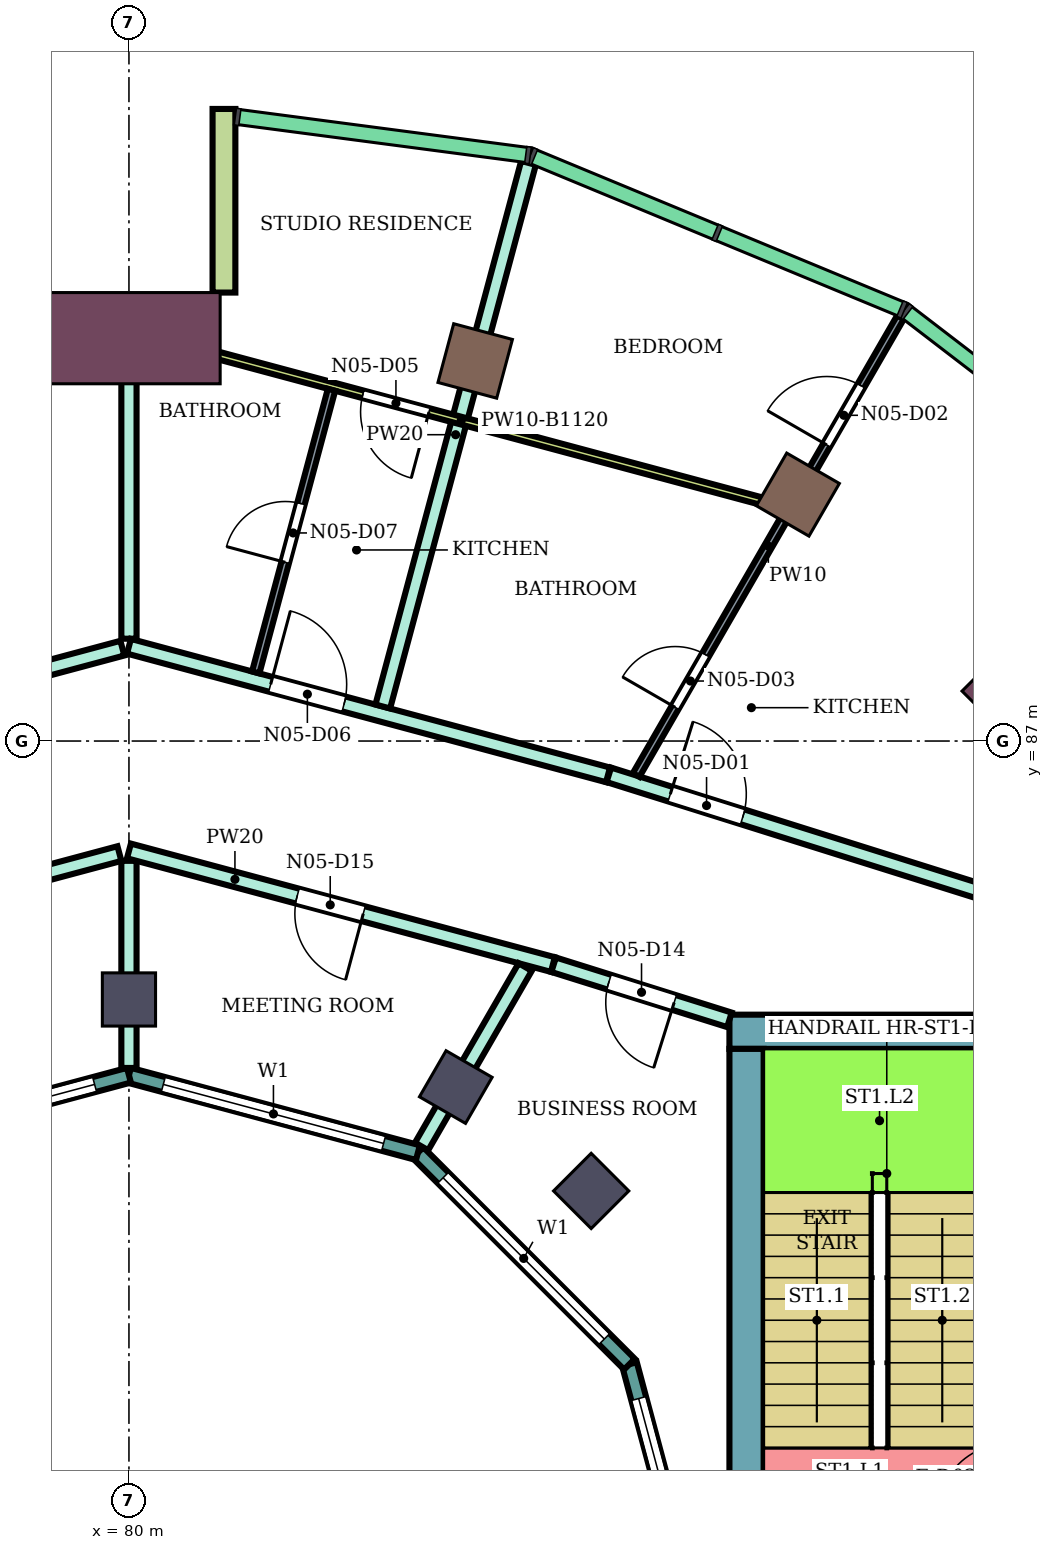
"""IFC4 building model, lengths in metres.
Left out: names, types, materials, properties, quantities, classifications, styles, units other than length and angle.
Written with IfcOpenShell. Run it as: python <this file> out.ifc"""

import sys

from ifc_helpers import new_model, si_unit, direction, frame, frame_2d, origin, origin_2d, place, context, subcontext, project, spatial, rectangle, extrude, element, fill, save


model = new_model("IFC4")
c1 = context("Model", 3, precision=1e-05, world=origin(), true_north=direction((0.0, 1.0)))
c2 = subcontext(c1, "Body", "Model", "MODEL_VIEW")
j1 = project(units=[si_unit("LENGTHUNIT", "METRE"), si_unit("PLANEANGLEUNIT", "RADIAN")], contexts=[c1])
p1 = place(None, origin())
s1 = spatial("IfcSite", under=j1, at=p1, CompositionType="ELEMENT")
p2 = place(p1, origin())
s2 = spatial("IfcBuilding", under=s1, at=p2, CompositionType="ELEMENT")
p3 = place(p2, frame((0.0, 0.0, 319.3)))
s3 = spatial("IfcBuildingStorey", under=s2, at=p3, CompositionType="ELEMENT", Elevation=319.3)
for number, where, z_axis, x_axis in (
    (1, (88.8, 90.242, 0.0), (0.0, 0.0, 1.0), (0.5, 0.866, 0.0)),
    (2, (84.555, 92.0, 0.0), (0.0, 0.0, 1.0), (0.259, 0.966, 0.0)),
):
    element("IfcColumn", number, at=place(p3, frame(where, z_axis=z_axis, x_axis=x_axis)), inside=s3, PredefinedType="COLUMN", context=c2, shape_type="SweptSolid", body=[
        extrude(rectangle(XDim=0.8, YDim=0.8, at=origin_2d()), origin(), (0.0, 0.0, 1.0), 4.4),
    ])
for number, where, z_axis, x_axis in (
    (3, (86.081, 81.081, 0.0), (0.0, 0.0, 1.0), (0.707, 0.707, 0.0)),
    (4, (84.3, 82.448, 0.0), (0.0, 0.0, 1.0), (0.5, 0.866, 0.0)),
    (5, (80.0, 83.6, 0.0), (0.0, 0.0, 1.0), (0.0, 1.0, 0.0)),
):
    element("IfcColumn", number, at=place(p3, frame(where, z_axis=z_axis, x_axis=x_axis)), inside=s3, PredefinedType="COLUMN", context=c2, shape_type="SweptSolid", body=[
        extrude(rectangle(XDim=0.7, YDim=0.7, at=origin_2d()), origin(), (0.0, 0.0, 1.0), 4.4),
    ])
for number, where, z_axis, x_axis in (
    (6, (92.233, 87.233, 0.0), (0.0, 0.0, 1.0), (0.707, 0.707, 0.0)),
    (7, (80.0, 92.3, 0.0), (0.0, 0.0, 1.0), (0.0, 1.0, 0.0)),
):
    element("IfcColumn", number, at=place(p3, frame(where, z_axis=z_axis, x_axis=x_axis)), inside=s3, PredefinedType="COLUMN", context=c2, shape_type="SweptSolid", body=[
        extrude(rectangle(XDim=1.2, YDim=2.4, at=origin_2d()), origin(), (0.0, 0.0, 1.0), 4.4),
    ])
p4 = place(p3, frame((87.9, 83.175, 0.0), z_axis=(0.0, 0.0, 1.0), x_axis=(1.0, 0.0, 0.0)))
e8 = element("IfcWall", 8, at=p4, inside=s3, PredefinedType="SHEAR", context=c2, shape_type="SweptSolid", body=[
    extrude(rectangle(XDim=10.0, YDim=0.45, at=frame_2d((5.0, 0.0))), origin(), (0.0, 0.0, 1.0), 4.08),
])
p5 = place(p4, frame((4.2, 0.0, 0.0)))
e9 = element("IfcOpeningElement", 9, at=p5, cuts=e8, PredefinedType="OPENING", context=c2, shape_type="SweptSolid", body=[
    extrude(rectangle(XDim=2.4, YDim=2.4, at=frame_2d((1.2, 1.2))), frame((0.0, 0.235, 0.0), z_axis=(0.0, -1.0, 0.0), x_axis=(1.0, 0.0, 0.0)), (0.0, 0.0, 1.0), 0.47),
])
p6 = place(p3, frame((88.125, 75.0, 0.0), z_axis=(0.0, 0.0, 1.0), x_axis=(0.0, 1.0, 0.0)))
e10 = element("IfcWall", 10, at=p6, inside=s3, PredefinedType="SHEAR", context=c2, shape_type="SweptSolid", body=[
    extrude(rectangle(XDim=7.95, YDim=0.45, at=frame_2d((3.975, 0.0))), origin(), (0.0, 0.0, 1.0), 4.08),
])
p7 = place(p3, frame((81.25, 92.9, 0.0), z_axis=(0.0, 0.0, 1.0), x_axis=(0.0, 1.0, 0.0)))
e11 = element("IfcWall", 11, at=p7, inside=s3, PredefinedType="NOTDEFINED", context=c2, shape_type="SweptSolid", body=[
    extrude(rectangle(XDim=2.416, YDim=0.3, at=frame_2d((1.208, 0.0))), origin(), (0.0, 0.0, 1.0), 4.4),
])
p8 = place(p3, frame((87.604, 75.0, 0.0), z_axis=(0.0, 0.0, 1.0), x_axis=(-0.258789828301, 0.965933654434, 0.0)))
e12 = element("IfcWall", 12, at=p8, inside=s3, PredefinedType="NOTDEFINED", context=c2, shape_type="SweptSolid", body=[
    extrude(rectangle(XDim=3.936, YDim=0.2, at=frame_2d((1.968, 0.0))), origin(), (0.0, 0.0, 1.0), 4.4),
])
p9 = place(p8, frame((0.468, 0.0, 0.9)))
e13 = element("IfcOpeningElement", 13, at=p9, cuts=e12, PredefinedType="OPENING", context=c2, shape_type="SweptSolid", body=[
    extrude(rectangle(XDim=3.0, YDim=2.3, at=frame_2d((1.5, 1.15))), frame((0.0, 0.11, 0.0), z_axis=(0.0, -1.0, 0.0), x_axis=(1.0, 0.0, 0.0)), (0.0, 0.0, 1.0), 0.22),
])
p10 = place(p3, frame((86.585, 78.802, 0.0), z_axis=(0.0, 0.0, 1.0), x_axis=(-0.707106781187, 0.707106781187, 0.0)))
e14 = element("IfcWall", 14, at=p10, inside=s3, PredefinedType="NOTDEFINED", context=c2, shape_type="SweptSolid", body=[
    extrude(rectangle(XDim=3.936, YDim=0.2, at=frame_2d((1.968, 0.0))), origin(), (0.0, 0.0, 1.0), 4.4),
])
p11 = place(p10, frame((0.468, 0.0, 0.9)))
e15 = element("IfcOpeningElement", 15, at=p11, cuts=e14, PredefinedType="OPENING", context=c2, shape_type="SweptSolid", body=[
    extrude(rectangle(XDim=3.0, YDim=2.3, at=frame_2d((1.5, 1.15))), frame((0.0, 0.11, 0.0), z_axis=(0.0, -1.0, 0.0), x_axis=(1.0, 0.0, 0.0)), (0.0, 0.0, 1.0), 0.22),
])
p12 = place(p3, frame((83.802, 81.585, 0.0), z_axis=(0.0, 0.0, 1.0), x_axis=(-0.965933654434, 0.258789828301, 0.0)))
e16 = element("IfcWall", 16, at=p12, inside=s3, PredefinedType="NOTDEFINED", context=c2, shape_type="SweptSolid", body=[
    extrude(rectangle(XDim=3.936, YDim=0.2, at=frame_2d((1.968, 0.0))), origin(), (0.0, 0.0, 1.0), 4.4),
])
p13 = place(p12, frame((0.468, 0.0, 0.9)))
e17 = element("IfcOpeningElement", 17, at=p13, cuts=e16, PredefinedType="OPENING", context=c2, shape_type="SweptSolid", body=[
    extrude(rectangle(XDim=3.0, YDim=2.3, at=frame_2d((1.5, 1.15))), frame((0.0, 0.11, 0.0), z_axis=(0.0, -1.0, 0.0), x_axis=(1.0, 0.0, 0.0)), (0.0, 0.0, 1.0), 0.22),
])
p14 = place(p3, frame((80.0, 82.604, 0.0), z_axis=(0.0, 0.0, 1.0), x_axis=(-0.965933654434, -0.258789828301, 0.0)))
e18 = element("IfcWall", 18, at=p14, inside=s3, PredefinedType="NOTDEFINED", context=c2, shape_type="SweptSolid", body=[
    extrude(rectangle(XDim=3.936, YDim=0.2, at=frame_2d((1.968, 0.0))), origin(), (0.0, 0.0, 1.0), 4.4),
])
p15 = place(p14, frame((0.468, 0.0, 0.9)))
e19 = element("IfcOpeningElement", 19, at=p15, cuts=e18, PredefinedType="OPENING", context=c2, shape_type="SweptSolid", body=[
    extrude(rectangle(XDim=3.0, YDim=2.3, at=frame_2d((1.5, 1.15))), frame((0.0, 0.11, 0.0), z_axis=(0.0, -1.0, 0.0), x_axis=(1.0, 0.0, 0.0)), (0.0, 0.0, 1.0), 0.22),
])
p16 = place(p3, frame((73.687, 86.554, 0.0), z_axis=(0.0, 0.0, 1.0), x_axis=(0.96595903825, 0.258695064551, 0.0)))
e20 = element("IfcWall", 20, at=p16, inside=s3, PredefinedType="PARTITIONING", context=c2, shape_type="SweptSolid", body=[
    extrude(rectangle(XDim=6.446, YDim=0.2, at=frame_2d((3.223, 0.0))), origin(), (0.0, 0.0, 1.0), 3.95),
])
p17 = place(p16, frame((3.638, 0.0, 0.0)))
e21 = element("IfcOpeningElement", 21, at=p17, cuts=e20, PredefinedType="OPENING", context=c2, shape_type="SweptSolid", body=[
    extrude(rectangle(XDim=1.0, YDim=2.1, at=frame_2d((0.5, 1.05))), frame((0.0, 0.11, 0.0), z_axis=(0.0, -1.0, 0.0), x_axis=(1.0, 0.0, 0.0)), (0.0, 0.0, 1.0), 0.22),
])
p18 = place(p3, frame((74.413, 84.057, 0.0), z_axis=(0.0, 0.0, 1.0), x_axis=(0.965972135939, 0.258646153246, 0.0)))
e22 = element("IfcWall", 22, at=p18, inside=s3, PredefinedType="PARTITIONING", context=c2, shape_type="SweptSolid", body=[
    extrude(rectangle(XDim=5.654, YDim=0.2, at=frame_2d((2.827, 0.0))), origin(), (0.0, 0.0, 1.0), 3.95),
])
p19 = place(p18, frame((2.593, 0.0, 0.0)))
e23 = element("IfcOpeningElement", 23, at=p19, cuts=e22, PredefinedType="OPENING", context=c2, shape_type="SweptSolid", body=[
    extrude(rectangle(XDim=0.9, YDim=2.1, at=frame_2d((0.45, 1.05))), frame((0.0, 0.11, 0.0), z_axis=(0.0, -1.0, 0.0), x_axis=(1.0, 0.0, 0.0)), (0.0, 0.0, 1.0), 0.22),
])
p20 = place(p3, frame((80.0, 82.699, 0.0), z_axis=(0.0, 0.0, 1.0), x_axis=(0.0, 1.0, 0.0)))
e24 = element("IfcWall", 24, at=p20, inside=s3, PredefinedType="PARTITIONING", context=c2, shape_type="SweptSolid", body=[
    extrude(rectangle(XDim=2.725, YDim=0.2, at=frame_2d((1.363, 0.0))), origin(), (0.0, 0.0, 1.0), 3.95),
])
p21 = place(p3, frame((80.0, 85.554, 0.0), z_axis=(0.0, 0.0, 1.0), x_axis=(0.965928989968, -0.258807237802, 0.0)))
e25 = element("IfcWall", 25, at=p21, inside=s3, PredefinedType="PARTITIONING", context=c2, shape_type="SweptSolid", body=[
    extrude(rectangle(XDim=5.774, YDim=0.2, at=frame_2d((2.887, 0.0))), origin(), (0.0, 0.0, 1.0), 3.95),
])
p22 = place(p21, frame((2.292, 0.0, 0.0)))
e26 = element("IfcOpeningElement", 26, at=p22, cuts=e25, PredefinedType="OPENING", context=c2, shape_type="SweptSolid", body=[
    extrude(rectangle(XDim=0.9, YDim=2.1, at=frame_2d((0.45, 1.05))), frame((0.0, 0.11, 0.0), z_axis=(0.0, -1.0, 0.0), x_axis=(1.0, 0.0, 0.0)), (0.0, 0.0, 1.0), 0.22),
])
p23 = place(p3, frame((80.0, 88.346, 0.0), z_axis=(0.0, 0.0, 1.0), x_axis=(0.0, 1.0, 0.0)))
e27 = element("IfcWall", 27, at=p23, inside=s3, PredefinedType="PARTITIONING", context=c2, shape_type="SweptSolid", body=[
    extrude(rectangle(XDim=4.354, YDim=0.2, at=frame_2d((2.177, 0.0))), origin(), (0.0, 0.0, 1.0), 3.95),
])
p24 = place(p3, frame((80.0, 88.247, 0.0), z_axis=(0.0, 0.0, 1.0), x_axis=(0.965807659316, -0.259259648244, 0.0)))
e28 = element("IfcWall", 28, at=p24, inside=s3, PredefinedType="PARTITIONING", context=c2, shape_type="SweptSolid", body=[
    extrude(rectangle(XDim=6.526, YDim=0.2, at=frame_2d((3.263, 0.0))), origin(), (0.0, 0.0, 1.0), 3.95),
])
p25 = place(p24, frame((1.93, 0.0, 0.0)))
e29 = element("IfcOpeningElement", 29, at=p25, cuts=e28, PredefinedType="OPENING", context=c2, shape_type="SweptSolid", body=[
    extrude(rectangle(XDim=1.0, YDim=2.1, at=frame_2d((0.5, 1.05))), frame((0.0, 0.11, 0.0), z_axis=(0.0, -1.0, 0.0), x_axis=(1.0, 0.0, 0.0)), (0.0, 0.0, 1.0), 0.22),
])
p26 = place(p3, frame((83.339, 87.455, 0.0), z_axis=(0.0, 0.0, 1.0), x_axis=(0.258957498737, 0.965888717114, 0.0)))
e30 = element("IfcWall", 30, at=p26, inside=s3, PredefinedType="PARTITIONING", context=c2, shape_type="SweptSolid", body=[
    extrude(rectangle(XDim=7.404, YDim=0.2, at=frame_2d((3.702, 0.0))), origin(), (0.0, 0.0, 1.0), 3.95),
])
p27 = place(p3, frame((83.85, 81.667, 0.0), z_axis=(0.0, 0.0, 1.0), x_axis=(0.500185068774, 0.865918527909, 0.0)))
e31 = element("IfcWall", 31, at=p27, inside=s3, PredefinedType="PARTITIONING", context=c2, shape_type="SweptSolid", body=[
    extrude(rectangle(XDim=2.726, YDim=0.2, at=frame_2d((1.363, 0.0))), origin(), (0.0, 0.0, 1.0), 3.95),
])
p28 = place(p3, frame((85.587, 84.057, 0.0), z_axis=(0.0, 0.0, 1.0), x_axis=(0.954239513179, -0.299043393987, 0.0)))
e32 = element("IfcWall", 32, at=p28, inside=s3, PredefinedType="PARTITIONING", context=c2, shape_type="SweptSolid", body=[
    extrude(rectangle(XDim=2.424, YDim=0.2, at=frame_2d((1.212, 0.0))), origin(), (0.0, 0.0, 1.0), 3.95),
])
p29 = place(p28, frame((0.762, 0.0, 0.0)))
e33 = element("IfcOpeningElement", 33, at=p29, cuts=e32, PredefinedType="OPENING", context=c2, shape_type="SweptSolid", body=[
    extrude(rectangle(XDim=0.9, YDim=2.1, at=frame_2d((0.45, 1.05))), frame((0.0, 0.11, 0.0), z_axis=(0.0, -1.0, 0.0), x_axis=(1.0, 0.0, 0.0)), (0.0, 0.0, 1.0), 0.22),
])
p30 = place(p3, frame((86.313, 86.555, 0.0), z_axis=(0.0, 0.0, 1.0), x_axis=(0.9540216201, -0.299737799389, 0.0)))
e34 = element("IfcWall", 34, at=p30, inside=s3, PredefinedType="PARTITIONING", context=c2, shape_type="SweptSolid", body=[
    extrude(rectangle(XDim=5.719, YDim=0.2, at=frame_2d((2.86, 0.0))), origin(), (0.0, 0.0, 1.0), 3.95),
])
p31 = place(p30, frame((0.848, 0.0, 0.0)))
e35 = element("IfcOpeningElement", 35, at=p31, cuts=e34, PredefinedType="OPENING", context=c2, shape_type="SweptSolid", body=[
    extrude(rectangle(XDim=1.0, YDim=2.1, at=frame_2d((0.5, 1.05))), frame((0.0, 0.11, 0.0), z_axis=(0.0, -1.0, 0.0), x_axis=(1.0, 0.0, 0.0)), (0.0, 0.0, 1.0), 0.22),
])
p32 = place(p3, frame((80.106, 92.359, 0.0), z_axis=(0.0, 0.0, 1.0), x_axis=(0.965889909151, -0.258953052501, 0.0)))
e36 = element("IfcWall", 36, at=p32, inside=s3, PredefinedType="PARTITIONING", context=c2, shape_type="SweptSolid", body=[
    extrude(rectangle(XDim=8.83, YDim=0.1, at=frame_2d((4.415, 0.0))), origin(), (0.0, 0.0, 1.0), 3.28),
])
p33 = place(p32, frame((3.076, 0.0, 0.0)))
e37 = element("IfcOpeningElement", 37, at=p33, cuts=e36, PredefinedType="OPENING", context=c2, shape_type="SweptSolid", body=[
    extrude(rectangle(XDim=0.9, YDim=2.1, at=frame_2d((0.45, 1.05))), frame((0.0, 0.06, 0.0), z_axis=(0.0, -1.0, 0.0), x_axis=(1.0, 0.0, 0.0)), (0.0, 0.0, 1.0), 0.12),
])
p34 = place(p3, frame((81.668, 87.903, 0.0), z_axis=(0.0, 0.0, 1.0), x_axis=(0.259020336752, 0.965871867873, 0.0)))
e38 = element("IfcWall", 38, at=p34, inside=s3, PredefinedType="PARTITIONING", context=c2, shape_type="SweptSolid", body=[
    extrude(rectangle(XDim=3.849, YDim=0.1, at=frame_2d((1.925, 0.0))), origin(), (0.0, 0.0, 1.0), 3.95),
])
p35 = place(p34, frame((1.5, 0.0, 0.0)))
e39 = element("IfcOpeningElement", 39, at=p35, cuts=e38, PredefinedType="OPENING", context=c2, shape_type="SweptSolid", body=[
    extrude(rectangle(XDim=0.8, YDim=2.1, at=frame_2d((0.4, 1.05))), frame((0.0, 0.06, 0.0), z_axis=(0.0, -1.0, 0.0), x_axis=(1.0, 0.0, 0.0)), (0.0, 0.0, 1.0), 0.12),
])
p36 = place(p3, frame((86.673, 86.553, 0.0), z_axis=(0.0, 0.0, 1.0), x_axis=(0.500103298341, 0.865965756245, 0.0)))
e40 = element("IfcWall", 40, at=p36, inside=s3, PredefinedType="PARTITIONING", context=c2, shape_type="SweptSolid", body=[
    extrude(rectangle(XDim=6.955, YDim=0.1, at=frame_2d((3.477, 0.0))), origin(), (0.0, 0.0, 1.0), 3.95),
])
p37 = place(p36, frame((5.015, 0.0, 0.0)))
e41 = element("IfcOpeningElement", 41, at=p37, cuts=e40, PredefinedType="OPENING", context=c2, shape_type="SweptSolid", body=[
    extrude(rectangle(XDim=0.9, YDim=2.1, at=frame_2d((0.45, 1.05))), frame((0.0, 0.06, 0.0), z_axis=(0.0, -1.0, 0.0), x_axis=(1.0, 0.0, 0.0)), (0.0, 0.0, 1.0), 0.12),
])
p38 = place(p36, frame((1.028, 0.0, 0.0)))
e42 = element("IfcOpeningElement", 42, at=p38, cuts=e40, PredefinedType="OPENING", context=c2, shape_type="SweptSolid", body=[
    extrude(rectangle(XDim=0.8, YDim=2.1, at=frame_2d((0.4, 1.05))), frame((0.0, 0.06, 0.0), z_axis=(0.0, -1.0, 0.0), x_axis=(1.0, 0.0, 0.0)), (0.0, 0.0, 1.0), 0.12),
])
p39 = place(p9, origin())
e43 = element("IfcWindow", 43, at=p39, inside=s3, PartitioningType="SINGLE_PANEL", PredefinedType="WINDOW", context=c2, shape_type="SweptSolid", body=[
    extrude(rectangle(XDim=3.0, YDim=2.3, at=frame_2d((1.5, 1.15))), frame((0.0, 0.03, 0.0), z_axis=(0.0, -1.0, 0.0), x_axis=(1.0, 0.0, 0.0)), (0.0, 0.0, 1.0), 0.06),
])
fill(e13, e43)
p40 = place(p11, origin())
e44 = element("IfcWindow", 44, at=p40, inside=s3, PartitioningType="SINGLE_PANEL", PredefinedType="WINDOW", context=c2, shape_type="SweptSolid", body=[
    extrude(rectangle(XDim=3.0, YDim=2.3, at=frame_2d((1.5, 1.15))), frame((0.0, 0.03, 0.0), z_axis=(0.0, -1.0, 0.0), x_axis=(1.0, 0.0, 0.0)), (0.0, 0.0, 1.0), 0.06),
])
fill(e15, e44)
p41 = place(p13, origin())
e45 = element("IfcWindow", 45, at=p41, inside=s3, PartitioningType="SINGLE_PANEL", PredefinedType="WINDOW", context=c2, shape_type="SweptSolid", body=[
    extrude(rectangle(XDim=3.0, YDim=2.3, at=frame_2d((1.5, 1.15))), frame((0.0, 0.03, 0.0), z_axis=(0.0, -1.0, 0.0), x_axis=(1.0, 0.0, 0.0)), (0.0, 0.0, 1.0), 0.06),
])
fill(e17, e45)
p42 = place(p15, origin())
e46 = element("IfcWindow", 46, at=p42, inside=s3, PartitioningType="SINGLE_PANEL", PredefinedType="WINDOW", context=c2, shape_type="SweptSolid", body=[
    extrude(rectangle(XDim=3.0, YDim=2.3, at=frame_2d((1.5, 1.15))), frame((0.0, 0.03, 0.0), z_axis=(0.0, -1.0, 0.0), x_axis=(1.0, 0.0, 0.0)), (0.0, 0.0, 1.0), 0.06),
])
fill(e19, e46)
p43 = place(p31, origin())
e47 = element("IfcDoor", 47, at=p43, inside=s3, OperationType="SINGLE_SWING_LEFT", PredefinedType="DOOR", context=c2, shape_type="SweptSolid", body=[
    extrude(rectangle(XDim=1.0, YDim=2.1, at=frame_2d((0.5, 1.05))), frame((0.0, 0.025, 0.0), z_axis=(0.0, -1.0, 0.0), x_axis=(1.0, 0.0, 0.0)), (0.0, 0.0, 1.0), 0.05),
])
fill(e35, e47)
p44 = place(p37, origin())
e48 = element("IfcDoor", 48, at=p44, inside=s3, OperationType="SINGLE_SWING_LEFT", PredefinedType="DOOR", context=c2, shape_type="SweptSolid", body=[
    extrude(rectangle(XDim=0.9, YDim=2.1, at=frame_2d((0.45, 1.05))), frame((0.0, 0.025, 0.0), z_axis=(0.0, -1.0, 0.0), x_axis=(1.0, 0.0, 0.0)), (0.0, 0.0, 1.0), 0.05),
])
fill(e41, e48)
p45 = place(p38, origin())
e49 = element("IfcDoor", 49, at=p45, inside=s3, OperationType="SINGLE_SWING_LEFT", PredefinedType="DOOR", context=c2, shape_type="SweptSolid", body=[
    extrude(rectangle(XDim=0.8, YDim=2.1, at=frame_2d((0.4, 1.05))), frame((0.0, 0.025, 0.0), z_axis=(0.0, -1.0, 0.0), x_axis=(1.0, 0.0, 0.0)), (0.0, 0.0, 1.0), 0.05),
])
fill(e42, e49)
p46 = place(p33, frame((0.9, 0.0, 0.0), z_axis=(0.0, 0.0, 1.0), x_axis=(-1.0, 0.0, 0.0)))
e50 = element("IfcDoor", 50, at=p46, inside=s3, OperationType="SINGLE_SWING_LEFT", PredefinedType="DOOR", context=c2, shape_type="SweptSolid", body=[
    extrude(rectangle(XDim=0.9, YDim=2.1, at=frame_2d((0.45, 1.05))), frame((0.0, 0.025, 0.0), z_axis=(0.0, -1.0, 0.0), x_axis=(1.0, 0.0, 0.0)), (0.0, 0.0, 1.0), 0.05),
])
fill(e37, e50)
p47 = place(p25, origin())
e51 = element("IfcDoor", 51, at=p47, inside=s3, OperationType="SINGLE_SWING_LEFT", PredefinedType="DOOR", context=c2, shape_type="SweptSolid", body=[
    extrude(rectangle(XDim=1.0, YDim=2.1, at=frame_2d((0.5, 1.05))), frame((0.0, 0.025, 0.0), z_axis=(0.0, -1.0, 0.0), x_axis=(1.0, 0.0, 0.0)), (0.0, 0.0, 1.0), 0.05),
])
fill(e29, e51)
p48 = place(p35, origin())
e52 = element("IfcDoor", 52, at=p48, inside=s3, OperationType="SINGLE_SWING_LEFT", PredefinedType="DOOR", context=c2, shape_type="SweptSolid", body=[
    extrude(rectangle(XDim=0.8, YDim=2.1, at=frame_2d((0.4, 1.05))), frame((0.0, 0.025, 0.0), z_axis=(0.0, -1.0, 0.0), x_axis=(1.0, 0.0, 0.0)), (0.0, 0.0, 1.0), 0.05),
])
fill(e39, e52)
p49 = place(p29, frame((0.9, 0.0, 0.0), z_axis=(0.0, 0.0, 1.0), x_axis=(-1.0, 0.0, 0.0)))
e53 = element("IfcDoor", 53, at=p49, inside=s3, OperationType="SINGLE_SWING_LEFT", PredefinedType="DOOR", context=c2, shape_type="SweptSolid", body=[
    extrude(rectangle(XDim=0.9, YDim=2.1, at=frame_2d((0.45, 1.05))), frame((0.0, 0.025, 0.0), z_axis=(0.0, -1.0, 0.0), x_axis=(1.0, 0.0, 0.0)), (0.0, 0.0, 1.0), 0.05),
])
fill(e33, e53)
p50 = place(p22, frame((0.9, 0.0, 0.0), z_axis=(0.0, 0.0, 1.0), x_axis=(-1.0, 0.0, 0.0)))
e54 = element("IfcDoor", 54, at=p50, inside=s3, OperationType="SINGLE_SWING_LEFT", PredefinedType="DOOR", context=c2, shape_type="SweptSolid", body=[
    extrude(rectangle(XDim=0.9, YDim=2.1, at=frame_2d((0.45, 1.05))), frame((0.0, 0.025, 0.0), z_axis=(0.0, -1.0, 0.0), x_axis=(1.0, 0.0, 0.0)), (0.0, 0.0, 1.0), 0.05),
])
fill(e26, e54)
save(model, sys.argv[1])
